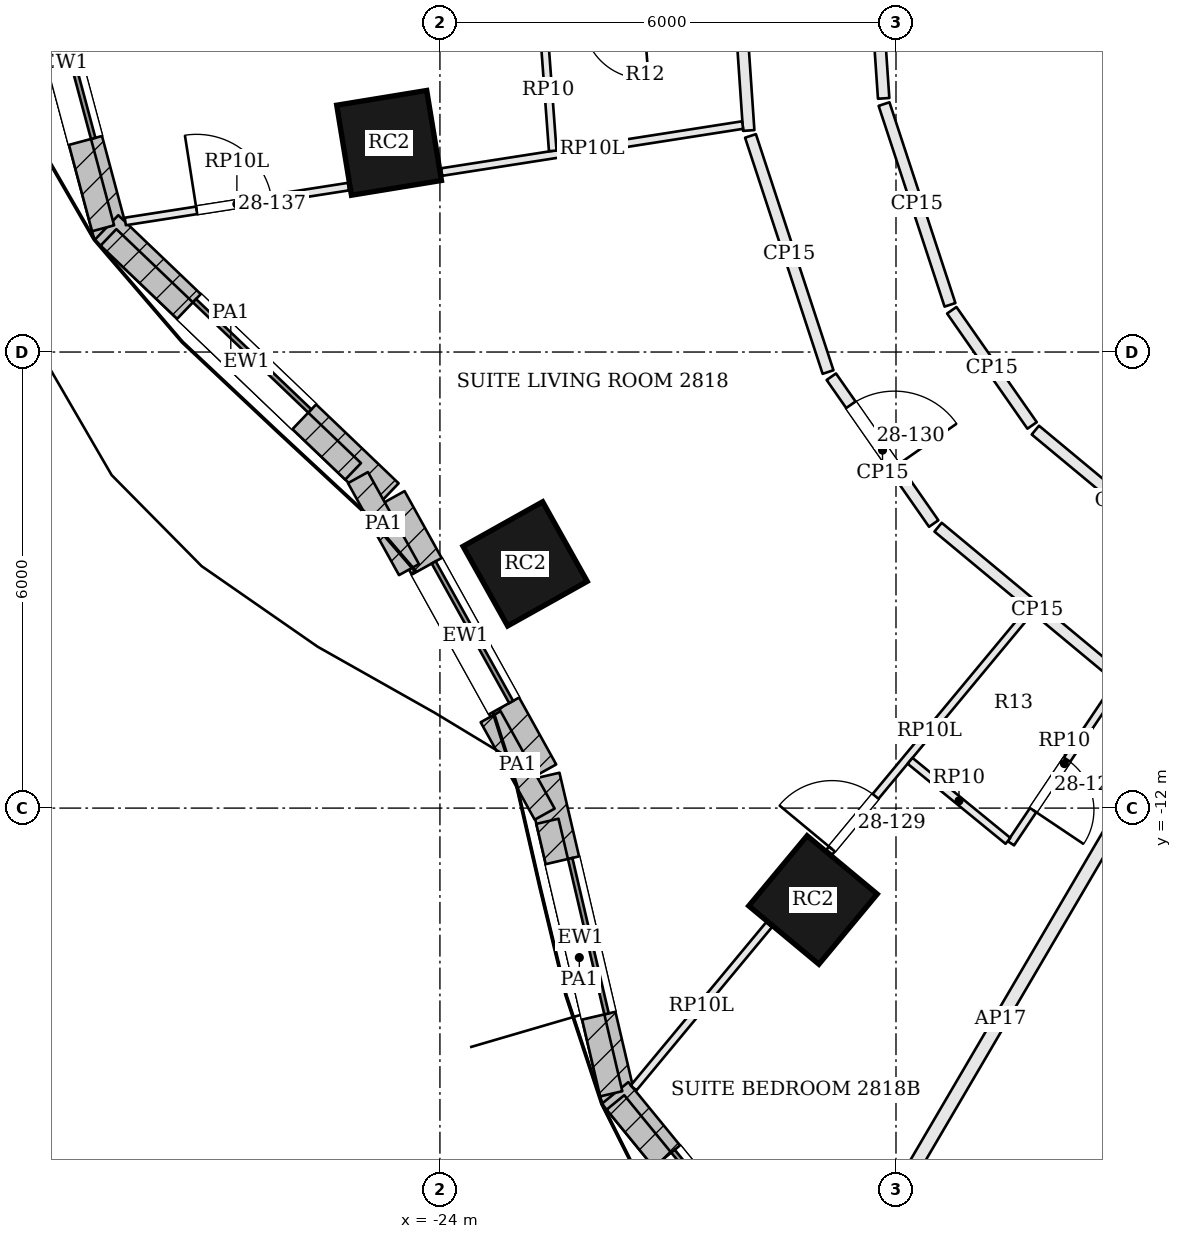
"""IFC4 building model, lengths in metres.
Left out: names, types, materials, properties, quantities, classifications, styles, units other than length and angle.
Written with IfcOpenShell. Run it as: python <this file> out.ifc"""

import sys

from ifc_helpers import new_model, si_unit, direction, frame, frame_2d, origin, origin_2d, place, context, subcontext, project, spatial, rectangle, extrude, element, fill, save


model = new_model("IFC4")
c1 = context("Model", 3, precision=1e-05, world=origin(), true_north=direction((0.0, 1.0)))
c2 = subcontext(c1, "Body", "Model", "MODEL_VIEW")
j1 = project(units=[si_unit("LENGTHUNIT", "METRE"), si_unit("PLANEANGLEUNIT", "RADIAN")], contexts=[c1])
p1 = place(None, origin())
s1 = spatial("IfcSite", under=j1, at=p1, CompositionType="ELEMENT")
p2 = place(p1, origin())
s2 = spatial("IfcBuilding", under=s1, at=p2, CompositionType="ELEMENT")
p3 = place(p2, frame((0.0, 0.0, 117.6)))
s3 = spatial("IfcBuildingStorey", under=s2, at=p3, CompositionType="ELEMENT", Elevation=117.6)
for number, where, z_axis, x_axis in (
    (1, (-24.669, -3.248, 0.0), (0.0, 0.0, 1.0), (0.162, -0.987, 0.0)),
    (2, (-22.879, -8.787, 0.0), (0.0, 0.0, 1.0), (0.489, -0.873, 0.0)),
    (3, (-19.092, -13.209, 0.0), (0.0, 0.0, 1.0), (0.769, -0.639, 0.0)),
):
    element("IfcColumn", number, at=place(p3, frame(where, z_axis=z_axis, x_axis=x_axis)), inside=s3, PredefinedType="COLUMN", context=c2, shape_type="SweptSolid", body=[
        extrude(rectangle(XDim=1.2, YDim=1.2, at=origin_2d()), origin(), (0.0, 0.0, 1.0), 2.8),
    ])
p4 = place(p3, frame((-29.54, 0.058, 0.0), z_axis=(0.0, 0.0, 1.0), x_axis=(0.258581372102, -0.96598947924, 0.0)))
e4 = element("IfcWall", 4, at=p4, inside=s3, PredefinedType="SOLIDWALL", context=c2, shape_type="SweptSolid", body=[
    extrude(rectangle(XDim=4.68, YDim=0.45, at=frame_2d((2.34, 0.0))), origin(), (0.0, 0.0, 1.0), 3.3),
])
p5 = place(p4, frame((1.29, 0.0, 0.9)))
e5 = element("IfcOpeningElement", 5, at=p5, cuts=e4, PredefinedType="OPENING", context=c2, shape_type="SweptSolid", body=[
    extrude(rectangle(XDim=2.1, YDim=1.8, at=frame_2d((1.05, 0.9))), frame((0.0, 0.235, 0.0), z_axis=(0.0, -1.0, 0.0), x_axis=(1.0, 0.0, 0.0)), (0.0, 0.0, 1.0), 0.47),
])
p6 = place(p3, frame((-28.387, -4.363, 0.0), z_axis=(0.0, 0.0, 1.0), x_axis=(0.722717697728, -0.691143349379, 0.0)))
e6 = element("IfcWall", 6, at=p6, inside=s3, PredefinedType="SOLIDWALL", context=c2, shape_type="SweptSolid", body=[
    extrude(rectangle(XDim=5.103, YDim=0.45, at=frame_2d((2.552, 0.0))), origin(), (0.0, 0.0, 1.0), 3.3),
])
p7 = place(p6, frame((1.502, 0.0, 0.9)))
e7 = element("IfcOpeningElement", 7, at=p7, cuts=e6, PredefinedType="OPENING", context=c2, shape_type="SweptSolid", body=[
    extrude(rectangle(XDim=2.1, YDim=1.8, at=frame_2d((1.05, 0.9))), frame((0.0, 0.235, 0.0), z_axis=(0.0, -1.0, 0.0), x_axis=(1.0, 0.0, 0.0)), (0.0, 0.0, 1.0), 0.47),
])
p8 = place(p3, frame((-24.662, -7.939, 0.0), z_axis=(0.0, 0.0, 1.0), x_axis=(0.485153910721, -0.874428775208, 0.0)))
e8 = element("IfcWall", 8, at=p8, inside=s3, PredefinedType="SOLIDWALL", context=c2, shape_type="SweptSolid", body=[
    extrude(rectangle(XDim=4.112, YDim=0.45, at=frame_2d((2.056, 0.0))), origin(), (0.0, 0.0, 1.0), 3.3),
])
p9 = place(p8, frame((1.006, 0.0, 0.9)))
e9 = element("IfcOpeningElement", 9, at=p9, cuts=e8, PredefinedType="OPENING", context=c2, shape_type="SweptSolid", body=[
    extrude(rectangle(XDim=2.1, YDim=1.8, at=frame_2d((1.05, 0.9))), frame((0.0, 0.235, 0.0), z_axis=(0.0, -1.0, 0.0), x_axis=(1.0, 0.0, 0.0)), (0.0, 0.0, 1.0), 0.47),
])
p10 = place(p3, frame((-22.646, -11.586, 0.0), z_axis=(0.0, 0.0, 1.0), x_axis=(0.227925124198, -0.973678662475, 0.0)))
e10 = element("IfcWall", 10, at=p10, inside=s3, PredefinedType="SOLIDWALL", context=c2, shape_type="SweptSolid", body=[
    extrude(rectangle(XDim=4.361, YDim=0.45, at=frame_2d((2.18, 0.0))), origin(), (0.0, 0.0, 1.0), 3.3),
])
p11 = place(p10, frame((1.13, 0.0, 0.9)))
e11 = element("IfcOpeningElement", 11, at=p11, cuts=e10, PredefinedType="OPENING", context=c2, shape_type="SweptSolid", body=[
    extrude(rectangle(XDim=2.1, YDim=1.8, at=frame_2d((1.05, 0.9))), frame((0.0, 0.235, 0.0), z_axis=(0.0, -1.0, 0.0), x_axis=(1.0, 0.0, 0.0)), (0.0, 0.0, 1.0), 0.47),
])
p12 = place(p3, frame((-21.696, -15.748, 0.0), z_axis=(0.0, 0.0, 1.0), x_axis=(0.632968710519, -0.774177377288, 0.0)))
e12 = element("IfcWall", 12, at=p12, inside=s3, PredefinedType="SOLIDWALL", context=c2, shape_type="SweptSolid", body=[
    extrude(rectangle(XDim=4.25, YDim=0.45, at=frame_2d((2.125, 0.0))), origin(), (0.0, 0.0, 1.0), 3.3),
])
p13 = place(p12, frame((1.075, 0.0, 0.9)))
e13 = element("IfcOpeningElement", 13, at=p13, cuts=e12, PredefinedType="OPENING", context=c2, shape_type="SweptSolid", body=[
    extrude(rectangle(XDim=2.1, YDim=1.8, at=frame_2d((1.05, 0.9))), frame((0.0, 0.235, 0.0), z_axis=(0.0, -1.0, 0.0), x_axis=(1.0, 0.0, 0.0)), (0.0, 0.0, 1.0), 0.47),
])
p14 = place(p3, frame((-29.573, -0.108, 3.6), z_axis=(0.0, 0.0, 1.0), x_axis=(0.258523195294, -0.96600505045, 0.0)))
e14 = element("IfcWall", 14, at=p14, inside=s3, PredefinedType="PARAPET", context=c2, shape_type="SweptSolid", body=[
    extrude(rectangle(XDim=4.414, YDim=0.3, at=frame_2d((2.207, 0.0))), origin(), (0.0, 0.0, 1.0), 1.1),
])
p15 = place(p3, frame((-28.361, -4.491, 3.6), z_axis=(0.0, 0.0, 1.0), x_axis=(0.722718045729, -0.691142985479, 0.0)))
e15 = element("IfcWall", 15, at=p15, inside=s3, PredefinedType="PARAPET", context=c2, shape_type="SweptSolid", body=[
    extrude(rectangle(XDim=4.454, YDim=0.3, at=frame_2d((2.227, 0.0))), origin(), (0.0, 0.0, 1.0), 1.1),
])
p16 = place(p3, frame((-25.078, -7.652, 3.6), z_axis=(0.0, 0.0, 1.0), x_axis=(0.485193459679, -0.874406831335, 0.0)))
e16 = element("IfcWall", 16, at=p16, inside=s3, PredefinedType="PARAPET", context=c2, shape_type="SweptSolid", body=[
    extrude(rectangle(XDim=1.384, YDim=0.3, at=frame_2d((0.692, 0.0))), origin(), (0.0, 0.0, 1.0), 1.1),
])
p17 = place(p3, frame((-23.333, -10.798, 3.6), z_axis=(0.0, 0.0, 1.0), x_axis=(0.4851761923, -0.874416412486, 0.0)))
e17 = element("IfcWall", 17, at=p17, inside=s3, PredefinedType="PARAPET", context=c2, shape_type="SweptSolid", body=[
    extrude(rectangle(XDim=1.466, YDim=0.3, at=frame_2d((0.733, 0.0))), origin(), (0.0, 0.0, 1.0), 1.1),
])
p18 = place(p3, frame((-22.586, -12.174, 3.6), z_axis=(0.0, 0.0, 1.0), x_axis=(0.227889817295, -0.973686926673, 0.0)))
e18 = element("IfcWall", 18, at=p18, inside=s3, PredefinedType="PARAPET", context=c2, shape_type="SweptSolid", body=[
    extrude(rectangle(XDim=3.682, YDim=0.3, at=frame_2d((1.841, 0.0))), origin(), (0.0, 0.0, 1.0), 1.1),
])
p19 = place(p3, frame((-21.691, -15.872, 3.6), z_axis=(0.0, 0.0, 1.0), x_axis=(0.632984818356, -0.774164207214, 0.0)))
e19 = element("IfcWall", 19, at=p19, inside=s3, PredefinedType="PARAPET", context=c2, shape_type="SweptSolid", body=[
    extrude(rectangle(XDim=3.995, YDim=0.3, at=frame_2d((1.997, 0.0))), origin(), (0.0, 0.0, 1.0), 1.1),
])
p20 = place(p3, frame((-20.14, -0.124, 0.0), z_axis=(0.0, 0.0, 1.0), x_axis=(0.068260165727, -0.997667554737, 0.0)))
e20 = element("IfcWall", 20, at=p20, inside=s3, PredefinedType="PARTITIONING", context=c2, shape_type="SweptSolid", body=[
    extrude(rectangle(XDim=2.969, YDim=0.15, at=frame_2d((1.484, 0.0))), origin(), (0.0, 0.0, 1.0), 2.684),
])
p21 = place(p3, frame((-19.914, -3.157, 0.0), z_axis=(0.0, 0.0, 1.0), x_axis=(0.31208108916, -0.950055468796, 0.0)))
e21 = element("IfcWall", 21, at=p21, inside=s3, PredefinedType="PARTITIONING", context=c2, shape_type="SweptSolid", body=[
    extrude(rectangle(XDim=3.27, YDim=0.15, at=frame_2d((1.635, 0.0))), origin(), (0.0, 0.0, 1.0), 2.684),
])
p22 = place(p3, frame((-18.851, -6.325, 0.0), z_axis=(0.0, 0.0, 1.0), x_axis=(0.572090775968, -0.820190309656, 0.0)))
e22 = element("IfcWall", 22, at=p22, inside=s3, PredefinedType="PARTITIONING", context=c2, shape_type="SweptSolid", body=[
    extrude(rectangle(XDim=2.355, YDim=0.15, at=frame_2d((1.177, 0.0))), origin(), (0.0, 0.0, 1.0), 2.684),
])
p23 = place(p22, frame((0.45, 0.0, 0.0)))
e23 = element("IfcOpeningElement", 23, at=p23, cuts=e22, PredefinedType="OPENING", context=c2, shape_type="SweptSolid", body=[
    extrude(rectangle(XDim=1.0, YDim=2.1, at=frame_2d((0.5, 1.05))), frame((0.0, 0.085, 0.0), z_axis=(0.0, -1.0, 0.0), x_axis=(1.0, 0.0, 0.0)), (0.0, 0.0, 1.0), 0.17),
])
p24 = place(p3, frame((-17.446, -8.304, 0.0), z_axis=(0.0, 0.0, 1.0), x_axis=(0.769200174495, -0.639007896318, 0.0)))
e24 = element("IfcWall", 24, at=p24, inside=s3, PredefinedType="PARTITIONING", context=c2, shape_type="SweptSolid", body=[
    extrude(rectangle(XDim=3.39, YDim=0.15, at=frame_2d((1.695, 0.0))), origin(), (0.0, 0.0, 1.0), 2.684),
])
p25 = place(p3, frame((-18.949, -18.745, 0.0), z_axis=(0.0, 0.0, 1.0), x_axis=(0.505730402321, 0.862691578821, 0.0)))
e25 = element("IfcWall", 25, at=p25, inside=s3, PredefinedType="PARTITIONING", context=c2, shape_type="SweptSolid", body=[
    extrude(rectangle(XDim=9.195, YDim=0.175, at=frame_2d((4.597, 0.0))), origin(), (0.0, 0.0, 1.0), 2.684),
])
p26 = place(p3, frame((-13.917, -8.896, 0.0), z_axis=(0.0, 0.0, 1.0), x_axis=(-0.769130409479, 0.639091866021, 0.0)))
e26 = element("IfcWall", 26, at=p26, inside=s3, PredefinedType="PARTITIONING", context=c2, shape_type="SweptSolid", body=[
    extrude(rectangle(XDim=2.925, YDim=0.15, at=frame_2d((1.462, 0.0))), origin(), (0.0, 0.0, 1.0), 2.684),
])
p27 = place(p3, frame((-16.209, -6.966, 0.0), z_axis=(0.0, 0.0, 1.0), x_axis=(-0.572051367607, 0.820217795966, 0.0)))
e27 = element("IfcWall", 27, at=p27, inside=s3, PredefinedType="PARTITIONING", context=c2, shape_type="SweptSolid", body=[
    extrude(rectangle(XDim=1.848, YDim=0.15, at=frame_2d((0.924, 0.0))), origin(), (0.0, 0.0, 1.0), 2.684),
])
p28 = place(p3, frame((-17.29, -5.379, 0.0), z_axis=(0.0, 0.0, 1.0), x_axis=(-0.312009486843, 0.950078986253, 0.0)))
e28 = element("IfcWall", 28, at=p28, inside=s3, PredefinedType="PARTITIONING", context=c2, shape_type="SweptSolid", body=[
    extrude(rectangle(XDim=2.78, YDim=0.15, at=frame_2d((1.39, 0.0))), origin(), (0.0, 0.0, 1.0), 2.684),
])
p29 = place(p3, frame((-18.162, -2.663, 0.0), z_axis=(0.0, 0.0, 1.0), x_axis=(-0.068321828968, 0.997663333839, 0.0)))
e29 = element("IfcWall", 29, at=p29, inside=s3, PredefinedType="PARTITIONING", context=c2, shape_type="SweptSolid", body=[
    extrude(rectangle(XDim=2.669, YDim=0.15, at=frame_2d((1.335, 0.0))), origin(), (0.0, 0.0, 1.0), 2.684),
])
p30 = place(p3, frame((-28.14, -4.282, 0.0), z_axis=(0.0, 0.0, 1.0), x_axis=(0.988018688308, 0.154334285089, 0.0)))
e30 = element("IfcWall", 30, at=p30, inside=s3, PredefinedType="PARTITIONING", context=c2, shape_type="SweptSolid", body=[
    extrude(rectangle(XDim=2.972, YDim=0.1, at=frame_2d((1.486, 0.0))), origin(), (0.0, 0.0, 1.0), 2.28),
])
p31 = place(p30, frame((0.95, 0.0, 0.0)))
e31 = element("IfcOpeningElement", 31, at=p31, cuts=e30, PredefinedType="OPENING", context=c2, shape_type="SweptSolid", body=[
    extrude(rectangle(XDim=1.0, YDim=2.1, at=frame_2d((0.5, 1.05))), frame((0.0, 0.06, 0.0), z_axis=(0.0, -1.0, 0.0), x_axis=(1.0, 0.0, 0.0)), (0.0, 0.0, 1.0), 0.12),
])
p32 = place(p3, frame((-23.978, -3.632, 0.0), z_axis=(0.0, 0.0, 1.0), x_axis=(0.988026255512, 0.154285833501, 0.0)))
e32 = element("IfcWall", 32, at=p32, inside=s3, PredefinedType="PARTITIONING", context=c2, shape_type="SweptSolid", body=[
    extrude(rectangle(XDim=4.008, YDim=0.1, at=frame_2d((2.004, 0.0))), origin(), (0.0, 0.0, 1.0), 2.28),
])
p33 = place(p3, frame((-21.453, -15.682, 0.0), z_axis=(0.0, 0.0, 1.0), x_axis=(0.638677193702, 0.769474783371, 0.0)))
e33 = element("IfcWall", 33, at=p33, inside=s3, PredefinedType="PARTITIONING", context=c2, shape_type="SweptSolid", body=[
    extrude(rectangle(XDim=2.791, YDim=0.1, at=frame_2d((1.395, 0.0))), origin(), (0.0, 0.0, 1.0), 2.28),
])
p34 = place(p3, frame((-18.878, -12.58, 0.0), z_axis=(0.0, 0.0, 1.0), x_axis=(0.638746790079, 0.769417011876, 0.0)))
e34 = element("IfcWall", 34, at=p34, inside=s3, PredefinedType="PARTITIONING", context=c2, shape_type="SweptSolid", body=[
    extrude(rectangle(XDim=4.129, YDim=0.1, at=frame_2d((2.064, 0.0))), origin(), (0.0, 0.0, 1.0), 2.28),
])
p35 = place(p34, frame((0.055, 0.0, 0.0)))
e35 = element("IfcOpeningElement", 35, at=p35, cuts=e34, PredefinedType="OPENING", context=c2, shape_type="SweptSolid", body=[
    extrude(rectangle(XDim=0.9, YDim=2.1, at=frame_2d((0.45, 1.05))), frame((0.0, 0.06, 0.0), z_axis=(0.0, -1.0, 0.0), x_axis=(1.0, 0.0, 0.0)), (0.0, 0.0, 1.0), 0.12),
])
p36 = place(p3, frame((-22.635, -1.756, 0.0), z_axis=(0.0, 0.0, 1.0), x_axis=(0.07391097935, -0.997264843024, 0.0)))
e36 = element("IfcWall", 36, at=p36, inside=s3, PredefinedType="PARTITIONING", context=c2, shape_type="SweptSolid", body=[
    extrude(rectangle(XDim=1.602, YDim=0.1, at=frame_2d((0.801, 0.0))), origin(), (0.0, 0.0, 1.0), 2.684),
])
p37 = place(p3, frame((-15.081, -10.366, 0.0), z_axis=(0.0, 0.0, 1.0), x_axis=(-0.557375152116, -0.830260766147, 0.0)))
e37 = element("IfcWall", 37, at=p37, inside=s3, PredefinedType="PARTITIONING", context=c2, shape_type="SweptSolid", body=[
    extrude(rectangle(XDim=2.525, YDim=0.1, at=frame_2d((1.262, 0.0))), origin(), (0.0, 0.0, 1.0), 2.684),
])
p38 = place(p37, frame((1.2, 0.0, 0.0)))
e38 = element("IfcOpeningElement", 38, at=p38, cuts=e37, PredefinedType="OPENING", context=c2, shape_type="SweptSolid", body=[
    extrude(rectangle(XDim=0.8, YDim=2.1, at=frame_2d((0.4, 1.05))), frame((0.0, 0.06, 0.0), z_axis=(0.0, -1.0, 0.0), x_axis=(1.0, 0.0, 0.0)), (0.0, 0.0, 1.0), 0.12),
])
p39 = place(p3, frame((-16.527, -12.431, 0.0), z_axis=(0.0, 0.0, 1.0), x_axis=(-0.774094584634, 0.633069959831, 0.0)))
e39 = element("IfcWall", 39, at=p39, inside=s3, PredefinedType="PARTITIONING", context=c2, shape_type="SweptSolid", body=[
    extrude(rectangle(XDim=1.664, YDim=0.1, at=frame_2d((0.832, 0.0))), origin(), (0.0, 0.0, 1.0), 2.684),
])
p40 = place(p5, origin())
e40 = element("IfcWindow", 40, at=p40, inside=s3, PartitioningType="SINGLE_PANEL", PredefinedType="WINDOW", context=c2, shape_type="SweptSolid", body=[
    extrude(rectangle(XDim=2.1, YDim=1.8, at=frame_2d((1.05, 0.9))), frame((0.0, 0.135, 0.0), z_axis=(0.0, -1.0, 0.0), x_axis=(1.0, 0.0, 0.0)), (0.0, 0.0, 1.0), 0.06),
])
fill(e5, e40)
p41 = place(p7, origin())
e41 = element("IfcWindow", 41, at=p41, inside=s3, PartitioningType="SINGLE_PANEL", PredefinedType="WINDOW", context=c2, shape_type="SweptSolid", body=[
    extrude(rectangle(XDim=2.1, YDim=1.8, at=frame_2d((1.05, 0.9))), frame((0.0, 0.135, 0.0), z_axis=(0.0, -1.0, 0.0), x_axis=(1.0, 0.0, 0.0)), (0.0, 0.0, 1.0), 0.06),
])
fill(e7, e41)
p42 = place(p9, origin())
e42 = element("IfcWindow", 42, at=p42, inside=s3, PartitioningType="SINGLE_PANEL", PredefinedType="WINDOW", context=c2, shape_type="SweptSolid", body=[
    extrude(rectangle(XDim=2.1, YDim=1.8, at=frame_2d((1.05, 0.9))), frame((0.0, 0.135, 0.0), z_axis=(0.0, -1.0, 0.0), x_axis=(1.0, 0.0, 0.0)), (0.0, 0.0, 1.0), 0.06),
])
fill(e9, e42)
p43 = place(p11, origin())
e43 = element("IfcWindow", 43, at=p43, inside=s3, PartitioningType="SINGLE_PANEL", PredefinedType="WINDOW", context=c2, shape_type="SweptSolid", body=[
    extrude(rectangle(XDim=2.1, YDim=1.8, at=frame_2d((1.05, 0.9))), frame((0.0, 0.135, 0.0), z_axis=(0.0, -1.0, 0.0), x_axis=(1.0, 0.0, 0.0)), (0.0, 0.0, 1.0), 0.06),
])
fill(e11, e43)
p44 = place(p13, origin())
e44 = element("IfcWindow", 44, at=p44, inside=s3, PartitioningType="SINGLE_PANEL", PredefinedType="WINDOW", context=c2, shape_type="SweptSolid", body=[
    extrude(rectangle(XDim=2.1, YDim=1.8, at=frame_2d((1.05, 0.9))), frame((0.0, 0.135, 0.0), z_axis=(0.0, -1.0, 0.0), x_axis=(1.0, 0.0, 0.0)), (0.0, 0.0, 1.0), 0.06),
])
fill(e13, e44)
p45 = place(p38, origin())
e45 = element("IfcDoor", 45, at=p45, inside=s3, OperationType="SINGLE_SWING_RIGHT", PredefinedType="DOOR", context=c2, shape_type="SweptSolid", body=[
    extrude(rectangle(XDim=0.8, YDim=2.1, at=frame_2d((0.4, 1.05))), frame((0.0, 0.025, 0.0), z_axis=(0.0, -1.0, 0.0), x_axis=(1.0, 0.0, 0.0)), (0.0, 0.0, 1.0), 0.05),
])
fill(e38, e45)
p46 = place(p35, origin())
e46 = element("IfcDoor", 46, at=p46, inside=s3, OperationType="SINGLE_SWING_LEFT", PredefinedType="DOOR", context=c2, shape_type="SweptSolid", body=[
    extrude(rectangle(XDim=0.9, YDim=2.1, at=frame_2d((0.45, 1.05))), frame((0.0, 0.025, 0.0), z_axis=(0.0, -1.0, 0.0), x_axis=(1.0, 0.0, 0.0)), (0.0, 0.0, 1.0), 0.05),
])
fill(e35, e46)
p47 = place(p23, origin())
e47 = element("IfcDoor", 47, at=p47, inside=s3, OperationType="SINGLE_SWING_RIGHT", PredefinedType="DOOR", context=c2, shape_type="SweptSolid", body=[
    extrude(rectangle(XDim=1.0, YDim=2.1, at=frame_2d((0.5, 1.05))), frame((0.0, 0.025, 0.0), z_axis=(0.0, -1.0, 0.0), x_axis=(1.0, 0.0, 0.0)), (0.0, 0.0, 1.0), 0.05),
])
fill(e23, e47)
p48 = place(p31, origin())
e48 = element("IfcDoor", 48, at=p48, inside=s3, OperationType="SINGLE_SWING_LEFT", PredefinedType="DOOR", context=c2, shape_type="SweptSolid", body=[
    extrude(rectangle(XDim=1.0, YDim=2.1, at=frame_2d((0.5, 1.05))), frame((0.0, 0.025, 0.0), z_axis=(0.0, -1.0, 0.0), x_axis=(1.0, 0.0, 0.0)), (0.0, 0.0, 1.0), 0.05),
])
fill(e31, e48)
save(model, sys.argv[1])
